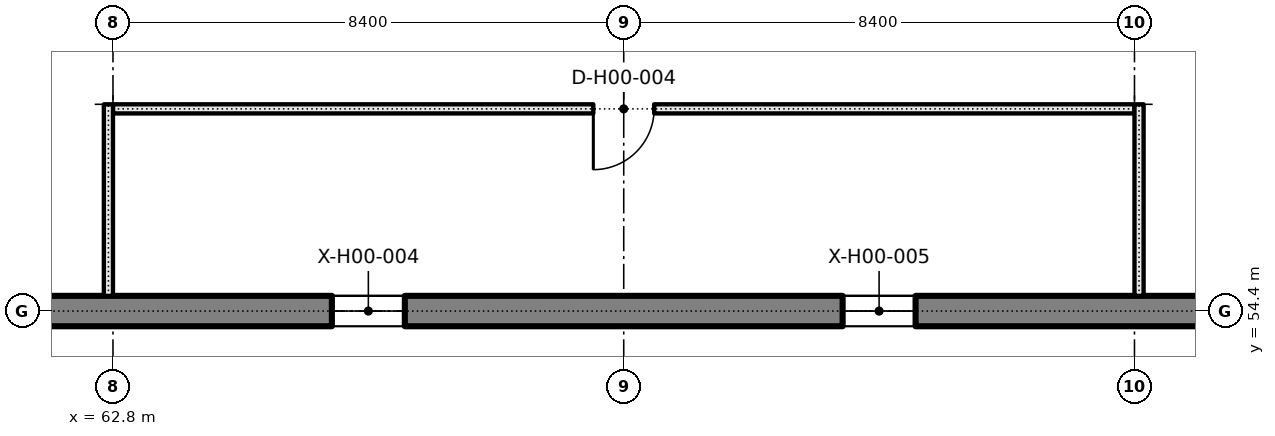
"""IFC4 building model, lengths in metres.
Left out: names, types, materials, properties, quantities, classifications, styles, units other than length and angle.
Written with IfcOpenShell. Run it as: python <this file> out.ifc"""

import sys

from ifc_helpers import new_model, si_unit, direction, frame, frame_2d, origin, place, context, subcontext, project, spatial, rectangle, extrude, element, fill, save


model = new_model("IFC4")
c1 = context("Model", 3, precision=1e-05, world=origin(), true_north=direction((0.0, 1.0)))
c2 = subcontext(c1, "Body", "Model", "MODEL_VIEW")
j1 = project(units=[si_unit("LENGTHUNIT", "METRE"), si_unit("PLANEANGLEUNIT", "RADIAN")], contexts=[c1])
p1 = place(None, origin())
s1 = spatial("IfcSite", under=j1, at=p1, CompositionType="ELEMENT")
p2 = place(p1, origin())
s2 = spatial("IfcBuilding", under=s1, at=p2, CompositionType="ELEMENT")
p3 = place(p2, origin())
s3 = spatial("IfcBuildingStorey", under=s2, at=p3, CompositionType="ELEMENT", Elevation=0.0)
p4 = place(p3, frame((29.45, 54.4, 0.0), z_axis=(0.0, 0.0, 1.0), x_axis=(1.0, 0.0, 0.0)))
e1 = element("IfcWall", 1, at=p4, inside=s3, PredefinedType="SOLIDWALL", context=c2, shape_type="SweptSolid", body=[
    extrude(rectangle(XDim=66.7, YDim=0.5, at=frame_2d((33.35, 0.0))), origin(), (0.0, 0.0, 1.0), 5.4),
])
p5 = place(p4, frame((11.75, 0.0, 0.9)))
e2 = element("IfcOpeningElement", 2, at=p5, cuts=e1, PredefinedType="OPENING", context=c2, shape_type="SweptSolid", body=[
    extrude(rectangle(XDim=1.2, YDim=3.6, at=frame_2d((0.6, 1.8))), frame((0.0, 0.26, 0.0), z_axis=(0.0, -1.0, 0.0), x_axis=(1.0, 0.0, 0.0)), (0.0, 0.0, 1.0), 0.52),
])
p6 = place(p4, frame((20.15, 0.0, 0.9)))
e3 = element("IfcOpeningElement", 3, at=p6, cuts=e1, PredefinedType="OPENING", context=c2, shape_type="SweptSolid", body=[
    extrude(rectangle(XDim=1.2, YDim=3.6, at=frame_2d((0.6, 1.8))), frame((0.0, 0.26, 0.0), z_axis=(0.0, -1.0, 0.0), x_axis=(1.0, 0.0, 0.0)), (0.0, 0.0, 1.0), 0.52),
])
p7 = place(p4, frame((28.55, 0.0, 0.9)))
e4 = element("IfcOpeningElement", 4, at=p7, cuts=e1, PredefinedType="OPENING", context=c2, shape_type="SweptSolid", body=[
    extrude(rectangle(XDim=1.2, YDim=3.6, at=frame_2d((0.6, 1.8))), frame((0.0, 0.26, 0.0), z_axis=(0.0, -1.0, 0.0), x_axis=(1.0, 0.0, 0.0)), (0.0, 0.0, 1.0), 0.52),
])
p8 = place(p4, frame((36.95, 0.0, 0.9)))
e5 = element("IfcOpeningElement", 5, at=p8, cuts=e1, PredefinedType="OPENING", context=c2, shape_type="SweptSolid", body=[
    extrude(rectangle(XDim=1.2, YDim=3.6, at=frame_2d((0.6, 1.8))), frame((0.0, 0.26, 0.0), z_axis=(0.0, -1.0, 0.0), x_axis=(1.0, 0.0, 0.0)), (0.0, 0.0, 1.0), 0.52),
])
p9 = place(p4, frame((45.35, 0.0, 0.9)))
e6 = element("IfcOpeningElement", 6, at=p9, cuts=e1, PredefinedType="OPENING", context=c2, shape_type="SweptSolid", body=[
    extrude(rectangle(XDim=1.2, YDim=3.6, at=frame_2d((0.6, 1.8))), frame((0.0, 0.26, 0.0), z_axis=(0.0, -1.0, 0.0), x_axis=(1.0, 0.0, 0.0)), (0.0, 0.0, 1.0), 0.52),
])
p10 = place(p4, frame((53.75, 0.0, 0.9)))
e7 = element("IfcOpeningElement", 7, at=p10, cuts=e1, PredefinedType="OPENING", context=c2, shape_type="SweptSolid", body=[
    extrude(rectangle(XDim=1.2, YDim=3.6, at=frame_2d((0.6, 1.8))), frame((0.0, 0.26, 0.0), z_axis=(0.0, -1.0, 0.0), x_axis=(1.0, 0.0, 0.0)), (0.0, 0.0, 1.0), 0.52),
])
p11 = place(p4, frame((0.1, 0.0, 0.0)))
e8 = element("IfcOpeningElement", 8, at=p11, cuts=e1, PredefinedType="OPENING", context=c2, shape_type="SweptSolid", body=[
    extrude(rectangle(XDim=1.5, YDim=2.1, at=frame_2d((0.75, 1.05))), frame((0.0, 0.26, 0.0), z_axis=(0.0, -1.0, 0.0), x_axis=(1.0, 0.0, 0.0)), (0.0, 0.0, 1.0), 0.52),
])
p12 = place(p4, frame((59.2, 0.0, 0.0)))
e9 = element("IfcOpeningElement", 9, at=p12, cuts=e1, PredefinedType="OPENING", context=c2, shape_type="SweptSolid", body=[
    extrude(rectangle(XDim=1.5, YDim=2.1, at=frame_2d((0.75, 1.05))), frame((0.0, 0.26, 0.0), z_axis=(0.0, -1.0, 0.0), x_axis=(1.0, 0.0, 0.0)), (0.0, 0.0, 1.0), 0.52),
])
p13 = place(p3, frame((29.45, 54.4, -0.5), z_axis=(0.0, 0.0, 1.0), x_axis=(1.0, 0.0, 0.0)))
e10 = element("IfcWall", 10, at=p13, inside=s3, PredefinedType="SOLIDWALL", context=c2, shape_type="SweptSolid", body=[
    extrude(rectangle(XDim=66.7, YDim=0.5, at=frame_2d((33.35, 0.0))), origin(), (0.0, 0.0, 1.0), 0.5),
])
p14 = place(p3, frame((62.8, 57.725, 0.0), z_axis=(0.0, 0.0, 1.0), x_axis=(1.0, 0.0, 0.0)))
e11 = element("IfcWall", 11, at=p14, inside=s3, PredefinedType="PARTITIONING", context=c2, shape_type="SweptSolid", body=[
    extrude(rectangle(XDim=16.8, YDim=0.15, at=frame_2d((8.4, 0.0))), origin(), (0.0, 0.0, 1.0), 5.15),
])
p15 = place(p14, frame((7.9, 0.0, 0.0)))
e12 = element("IfcOpeningElement", 12, at=p15, cuts=e11, PredefinedType="OPENING", context=c2, shape_type="SweptSolid", body=[
    extrude(rectangle(XDim=1.0, YDim=2.1, at=frame_2d((0.5, 1.05))), frame((0.0, 0.085, 0.0), z_axis=(0.0, -1.0, 0.0), x_axis=(1.0, 0.0, 0.0)), (0.0, 0.0, 1.0), 0.17),
])
p16 = place(p3, frame((62.725, 54.65, 0.0), z_axis=(0.0, 0.0, 1.0), x_axis=(0.0, 1.0, 0.0)))
e13 = element("IfcWall", 13, at=p16, inside=s3, PredefinedType="PARTITIONING", context=c2, shape_type="SweptSolid", body=[
    extrude(rectangle(XDim=3.15, YDim=0.15, at=frame_2d((1.575, 0.0))), origin(), (0.0, 0.0, 1.0), 5.15),
])
p17 = place(p3, frame((79.675, 54.65, 0.0), z_axis=(0.0, 0.0, 1.0), x_axis=(0.0, 1.0, 0.0)))
e14 = element("IfcWall", 14, at=p17, inside=s3, PredefinedType="PARTITIONING", context=c2, shape_type="SweptSolid", body=[
    extrude(rectangle(XDim=3.15, YDim=0.15, at=frame_2d((1.575, 0.0))), origin(), (0.0, 0.0, 1.0), 4.55),
])
p18 = place(p8, origin())
e15 = element("IfcWindow", 15, at=p18, inside=s3, PartitioningType="SINGLE_PANEL", PredefinedType="WINDOW", context=c2, shape_type="SweptSolid", body=[
    extrude(rectangle(XDim=1.2, YDim=3.6, at=frame_2d((0.6, 1.8))), frame((0.0, 0.03, 0.0), z_axis=(0.0, -1.0, 0.0), x_axis=(1.0, 0.0, 0.0)), (0.0, 0.0, 1.0), 0.06),
])
fill(e5, e15)
p19 = place(p9, origin())
e16 = element("IfcWindow", 16, at=p19, inside=s3, PartitioningType="SINGLE_PANEL", PredefinedType="WINDOW", context=c2, shape_type="SweptSolid", body=[
    extrude(rectangle(XDim=1.2, YDim=3.6, at=frame_2d((0.6, 1.8))), frame((0.0, 0.03, 0.0), z_axis=(0.0, -1.0, 0.0), x_axis=(1.0, 0.0, 0.0)), (0.0, 0.0, 1.0), 0.06),
])
fill(e6, e16)
p20 = place(p15, frame((1.0, 0.0, 0.0), z_axis=(0.0, 0.0, 1.0), x_axis=(-1.0, 0.0, 0.0)))
e17 = element("IfcDoor", 17, at=p20, inside=s3, OperationType="SINGLE_SWING_RIGHT", PredefinedType="DOOR", context=c2, shape_type="SweptSolid", body=[
    extrude(rectangle(XDim=1.0, YDim=2.1, at=frame_2d((0.5, 1.05))), frame((0.0, 0.025, 0.0), z_axis=(0.0, -1.0, 0.0), x_axis=(1.0, 0.0, 0.0)), (0.0, 0.0, 1.0), 0.05),
])
fill(e12, e17)
save(model, sys.argv[1])
